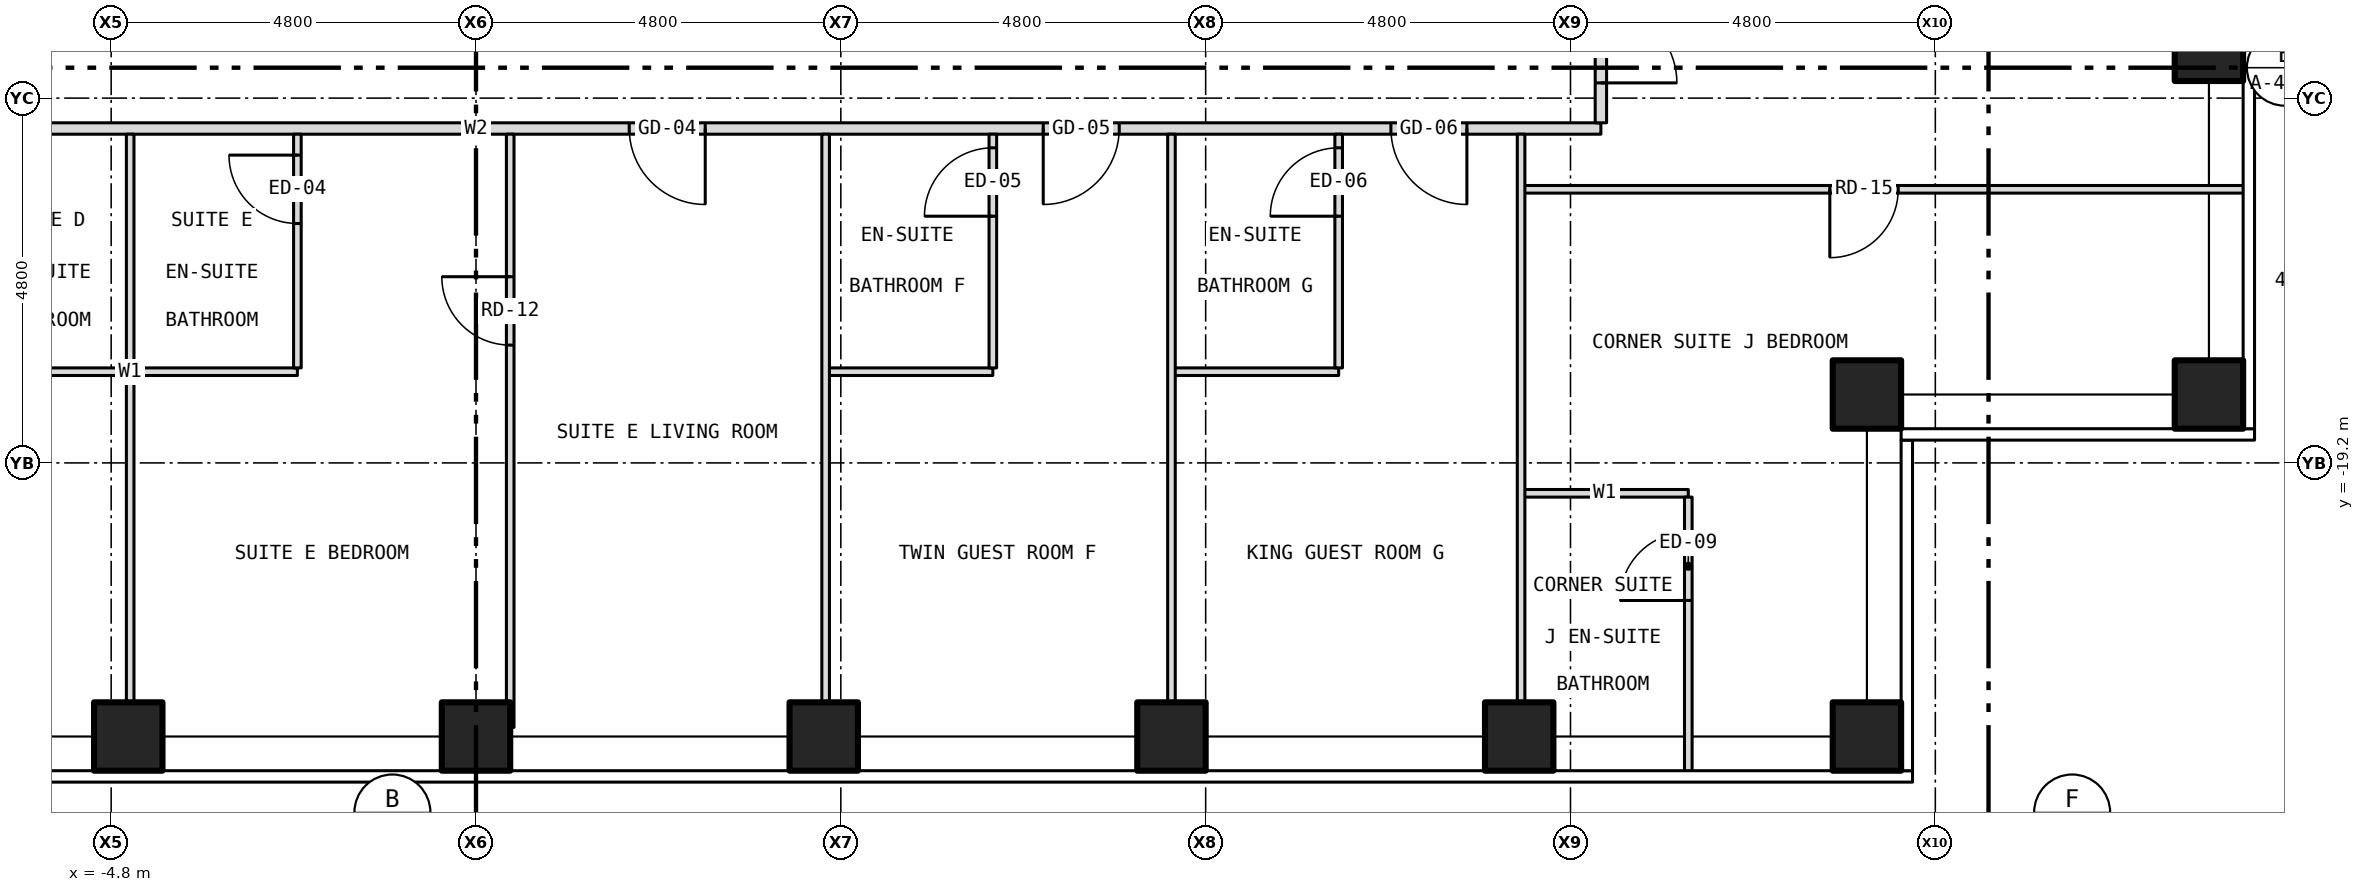
"""IFC4 building model, lengths in metres.
Left out: names, types, materials, properties, quantities, classifications, styles, units other than length and angle.
Written with IfcOpenShell. Run it as: python <this file> out.ifc"""

import sys

from ifc_helpers import new_model, si_unit, direction, frame, frame_2d, origin, origin_2d, place, context, subcontext, project, spatial, rectangle, hollow_rectangle, extrude, element, fill, save


model = new_model("IFC4")
c1 = context("Model", 3, precision=1e-05, world=origin(), true_north=direction((0.0, 1.0)))
c2 = subcontext(c1, "Body", "Model", "MODEL_VIEW")
j1 = project(units=[si_unit("LENGTHUNIT", "METRE"), si_unit("PLANEANGLEUNIT", "RADIAN")], contexts=[c1])
p1 = place(None, origin())
s1 = spatial("IfcSite", under=j1, at=p1, CompositionType="ELEMENT")
p2 = place(p1, origin())
s2 = spatial("IfcBuilding", under=s1, at=p2, CompositionType="ELEMENT")
p3 = place(p2, frame((0.0, 0.0, 103.0)))
s3 = spatial("IfcBuildingStorey", under=s2, at=p3, CompositionType="ELEMENT", Elevation=103.0)
for number, where, z_axis, x_axis in (
    (1, (-4.575, -22.8, -0.15), (0.0, 0.0, 1.0), (1.0, 0.0, 0.0)),
    (2, (0.0, -22.8, -0.15), (0.0, 0.0, 1.0), (1.0, 0.0, 0.0)),
    (3, (4.575, -22.8, -0.15), (0.0, 0.0, 1.0), (1.0, 0.0, 0.0)),
    (4, (9.15, -22.8, -0.15), (0.0, 0.0, 1.0), (1.0, 0.0, 0.0)),
    (5, (13.725, -22.8, -0.15), (0.0, 0.0, 1.0), (1.0, 0.0, 0.0)),
    (6, (18.3, -22.8, -0.15), (0.0, 0.0, 1.0), (1.0, 0.0, 0.0)),
    (7, (22.8, -18.3, -0.15), (0.0, 0.0, 1.0), (1.0, 0.0, 0.0)),
    (8, (22.8, -13.725, -0.15), (0.0, 0.0, 1.0), (1.0, 0.0, 0.0)),
    (9, (18.3, -18.3, -0.15), (0.0, 0.0, 1.0), (1.0, 0.0, 0.0)),
):
    element("IfcColumn", number, at=place(p3, frame(where, z_axis=z_axis, x_axis=x_axis)), inside=s3, PredefinedType="COLUMN", context=c2, shape_type="SweptSolid", body=[
        extrude(hollow_rectangle(XDim=0.9, YDim=0.9, WallThickness=0.05, at=origin_2d()), origin(), (0.0, 0.0, 1.0), 3.5),
    ])
p4 = place(p3, frame((13.75, -19.6, 0.0), z_axis=(0.0, 0.0, 1.0), x_axis=(1.0, 0.0, 0.0)))
e10 = element("IfcWall", 10, at=p4, inside=s3, PredefinedType="PARTITIONING", context=c2, shape_type="SweptSolid", body=[
    extrude(rectangle(XDim=2.2, YDim=0.1, at=frame_2d((1.1, 0.0))), origin(), (0.0, 0.0, 1.0), 3.35),
])
p5 = place(p3, frame((-6.75, -18.0, 0.0), z_axis=(0.0, 0.0, 1.0), x_axis=(1.0, 0.0, 0.0)))
e11 = element("IfcWall", 11, at=p5, inside=s3, PredefinedType="PARTITIONING", context=c2, shape_type="SweptSolid", body=[
    extrude(rectangle(XDim=4.4, YDim=0.1, at=frame_2d((2.2, 0.0))), origin(), (0.0, 0.0, 1.0), 3.35),
])
p6 = place(p3, frame((4.6, -18.0, 0.0), z_axis=(0.0, 0.0, 1.0), x_axis=(1.0, 0.0, 0.0)))
e12 = element("IfcWall", 12, at=p6, inside=s3, PredefinedType="PARTITIONING", context=c2, shape_type="SweptSolid", body=[
    extrude(rectangle(XDim=2.2, YDim=0.1, at=frame_2d((1.1, 0.0))), origin(), (0.0, 0.0, 1.0), 3.35),
])
p7 = place(p3, frame((9.15, -18.0, 0.0), z_axis=(0.0, 0.0, 1.0), x_axis=(1.0, 0.0, 0.0)))
e13 = element("IfcWall", 13, at=p7, inside=s3, PredefinedType="PARTITIONING", context=c2, shape_type="SweptSolid", body=[
    extrude(rectangle(XDim=2.2, YDim=0.1, at=frame_2d((1.1, 0.0))), origin(), (0.0, 0.0, 1.0), 3.35),
])
p8 = place(p3, frame((13.75, -15.6, 0.0), z_axis=(0.0, 0.0, 1.0), x_axis=(1.0, 0.0, 0.0)))
e14 = element("IfcWall", 14, at=p8, inside=s3, PredefinedType="PARTITIONING", context=c2, shape_type="SweptSolid", body=[
    extrude(rectangle(XDim=9.53, YDim=0.1, at=frame_2d((4.765, 0.0))), origin(), (0.0, 0.0, 1.0), 3.35),
])
p9 = place(p8, frame((4.062, 0.0, 0.0)))
e15 = element("IfcOpeningElement", 15, at=p9, cuts=e14, PredefinedType="OPENING", context=c2, shape_type="SweptSolid", body=[
    extrude(rectangle(XDim=0.9, YDim=2.1, at=frame_2d((0.45, 1.05))), frame((0.0, 0.062, 0.0), z_axis=(0.0, -1.0, 0.0), x_axis=(1.0, 0.0, 0.0)), (0.0, 0.0, 1.0), 0.124),
])
p10 = place(p3, frame((-14.8, -14.8, 0.0), z_axis=(0.0, 0.0, 1.0), x_axis=(1.0, 0.0, 0.0)))
e16 = element("IfcWall", 16, at=p10, inside=s3, PredefinedType="PARTITIONING", context=c2, shape_type="SweptSolid", body=[
    extrude(rectangle(XDim=29.6, YDim=0.15, at=frame_2d((14.8, 0.0))), origin(), (0.0, 0.0, 1.0), 3.35),
])
p11 = place(p10, frame((2.634, 0.0, 0.0)))
e17 = element("IfcOpeningElement", 17, at=p11, cuts=e16, PredefinedType="OPENING", context=c2, shape_type="SweptSolid", body=[
    extrude(rectangle(XDim=1.0, YDim=2.1, at=frame_2d((0.5, 1.05))), frame((0.0, 0.087, 0.0), z_axis=(0.0, -1.0, 0.0), x_axis=(1.0, 0.0, 0.0)), (0.0, 0.0, 1.0), 0.174),
])
p12 = place(p10, frame((16.816, 0.0, 0.0)))
e18 = element("IfcOpeningElement", 18, at=p12, cuts=e16, PredefinedType="OPENING", context=c2, shape_type="SweptSolid", body=[
    extrude(rectangle(XDim=1.0, YDim=2.1, at=frame_2d((0.5, 1.05))), frame((0.0, 0.087, 0.0), z_axis=(0.0, -1.0, 0.0), x_axis=(1.0, 0.0, 0.0)), (0.0, 0.0, 1.0), 0.174),
])
p13 = place(p10, frame((22.263, 0.0, 0.0)))
e19 = element("IfcOpeningElement", 19, at=p13, cuts=e16, PredefinedType="OPENING", context=c2, shape_type="SweptSolid", body=[
    extrude(rectangle(XDim=1.0, YDim=2.1, at=frame_2d((0.5, 1.05))), frame((0.0, 0.087, 0.0), z_axis=(0.0, -1.0, 0.0), x_axis=(1.0, 0.0, 0.0)), (0.0, 0.0, 1.0), 0.174),
])
p14 = place(p10, frame((26.837, 0.0, 0.0)))
e20 = element("IfcOpeningElement", 20, at=p14, cuts=e16, PredefinedType="OPENING", context=c2, shape_type="SweptSolid", body=[
    extrude(rectangle(XDim=1.0, YDim=2.1, at=frame_2d((0.5, 1.05))), frame((0.0, 0.087, 0.0), z_axis=(0.0, -1.0, 0.0), x_axis=(1.0, 0.0, 0.0)), (0.0, 0.0, 1.0), 0.174),
])
p15 = place(p3, frame((-4.55, -22.68, 0.0), z_axis=(0.0, 0.0, 1.0), x_axis=(0.0, 1.0, 0.0)))
e21 = element("IfcWall", 21, at=p15, inside=s3, PredefinedType="PARTITIONING", context=c2, shape_type="SweptSolid", body=[
    extrude(rectangle(XDim=4.63, YDim=0.1, at=frame_2d((2.315, 0.0))), origin(), (0.0, 0.0, 1.0), 3.35),
])
p16 = place(p3, frame((-4.55, -17.95, 0.0), z_axis=(0.0, 0.0, 1.0), x_axis=(0.0, 1.0, 0.0)))
e22 = element("IfcWall", 22, at=p16, inside=s3, PredefinedType="PARTITIONING", context=c2, shape_type="SweptSolid", body=[
    extrude(rectangle(XDim=3.075, YDim=0.1, at=frame_2d((1.538, 0.0))), origin(), (0.0, 0.0, 1.0), 3.35),
])
p17 = place(p3, frame((-2.35, -17.95, 0.0), z_axis=(0.0, 0.0, 1.0), x_axis=(0.0, 1.0, 0.0)))
e23 = element("IfcWall", 23, at=p17, inside=s3, PredefinedType="PARTITIONING", context=c2, shape_type="SweptSolid", body=[
    extrude(rectangle(XDim=3.075, YDim=0.1, at=frame_2d((1.538, 0.0))), origin(), (0.0, 0.0, 1.0), 3.35),
])
p18 = place(p17, frame((1.9, 0.0, 0.0)))
e24 = element("IfcOpeningElement", 24, at=p18, cuts=e23, PredefinedType="OPENING", context=c2, shape_type="SweptSolid", body=[
    extrude(rectangle(XDim=0.9, YDim=2.1, at=frame_2d((0.45, 1.05))), frame((0.0, 0.062, 0.0), z_axis=(0.0, -1.0, 0.0), x_axis=(1.0, 0.0, 0.0)), (0.0, 0.0, 1.0), 0.124),
])
p19 = place(p3, frame((0.45, -22.68, 0.0), z_axis=(0.0, 0.0, 1.0), x_axis=(0.0, 1.0, 0.0)))
e25 = element("IfcWall", 25, at=p19, inside=s3, PredefinedType="PARTITIONING", context=c2, shape_type="SweptSolid", body=[
    extrude(rectangle(XDim=7.805, YDim=0.1, at=frame_2d((3.902, 0.0))), origin(), (0.0, 0.0, 1.0), 3.35),
])
p20 = place(p19, frame((5.03, 0.0, 0.0)))
e26 = element("IfcOpeningElement", 26, at=p20, cuts=e25, PredefinedType="OPENING", context=c2, shape_type="SweptSolid", body=[
    extrude(rectangle(XDim=0.9, YDim=2.1, at=frame_2d((0.45, 1.05))), frame((0.0, 0.062, 0.0), z_axis=(0.0, -1.0, 0.0), x_axis=(1.0, 0.0, 0.0)), (0.0, 0.0, 1.0), 0.124),
])
p21 = place(p3, frame((4.6, -22.68, 0.0), z_axis=(0.0, 0.0, 1.0), x_axis=(0.0, 1.0, 0.0)))
e27 = element("IfcWall", 27, at=p21, inside=s3, PredefinedType="PARTITIONING", context=c2, shape_type="SweptSolid", body=[
    extrude(rectangle(XDim=7.805, YDim=0.1, at=frame_2d((3.902, 0.0))), origin(), (0.0, 0.0, 1.0), 3.35),
])
p22 = place(p3, frame((6.8, -17.95, 0.0), z_axis=(0.0, 0.0, 1.0), x_axis=(0.0, 1.0, 0.0)))
e28 = element("IfcWall", 28, at=p22, inside=s3, PredefinedType="PARTITIONING", context=c2, shape_type="SweptSolid", body=[
    extrude(rectangle(XDim=3.075, YDim=0.1, at=frame_2d((1.538, 0.0))), origin(), (0.0, 0.0, 1.0), 3.35),
])
p23 = place(p22, frame((1.996, 0.0, 0.0)))
e29 = element("IfcOpeningElement", 29, at=p23, cuts=e28, PredefinedType="OPENING", context=c2, shape_type="SweptSolid", body=[
    extrude(rectangle(XDim=0.9, YDim=2.1, at=frame_2d((0.45, 1.05))), frame((0.0, 0.062, 0.0), z_axis=(0.0, -1.0, 0.0), x_axis=(1.0, 0.0, 0.0)), (0.0, 0.0, 1.0), 0.124),
])
p24 = place(p3, frame((9.15, -22.68, 0.0), z_axis=(0.0, 0.0, 1.0), x_axis=(0.0, 1.0, 0.0)))
e30 = element("IfcWall", 30, at=p24, inside=s3, PredefinedType="PARTITIONING", context=c2, shape_type="SweptSolid", body=[
    extrude(rectangle(XDim=7.805, YDim=0.1, at=frame_2d((3.902, 0.0))), origin(), (0.0, 0.0, 1.0), 3.35),
])
p25 = place(p3, frame((11.35, -17.95, 0.0), z_axis=(0.0, 0.0, 1.0), x_axis=(0.0, 1.0, 0.0)))
e31 = element("IfcWall", 31, at=p25, inside=s3, PredefinedType="PARTITIONING", context=c2, shape_type="SweptSolid", body=[
    extrude(rectangle(XDim=3.075, YDim=0.1, at=frame_2d((1.538, 0.0))), origin(), (0.0, 0.0, 1.0), 3.35),
])
p26 = place(p25, frame((1.996, 0.0, 0.0)))
e32 = element("IfcOpeningElement", 32, at=p26, cuts=e31, PredefinedType="OPENING", context=c2, shape_type="SweptSolid", body=[
    extrude(rectangle(XDim=0.9, YDim=2.1, at=frame_2d((0.45, 1.05))), frame((0.0, 0.062, 0.0), z_axis=(0.0, -1.0, 0.0), x_axis=(1.0, 0.0, 0.0)), (0.0, 0.0, 1.0), 0.124),
])
p27 = place(p3, frame((13.75, -22.68, 0.0), z_axis=(0.0, 0.0, 1.0), x_axis=(0.0, 1.0, 0.0)))
e33 = element("IfcWall", 33, at=p27, inside=s3, PredefinedType="PARTITIONING", context=c2, shape_type="SweptSolid", body=[
    extrude(rectangle(XDim=7.805, YDim=0.1, at=frame_2d((3.902, 0.0))), origin(), (0.0, 0.0, 1.0), 3.35),
])
p28 = place(p3, frame((14.8, -14.725, 0.0), z_axis=(0.0, 0.0, 1.0), x_axis=(0.0, 1.0, 0.0)))
e34 = element("IfcWall", 34, at=p28, inside=s3, PredefinedType="PARTITIONING", context=c2, shape_type="SweptSolid", body=[
    extrude(rectangle(XDim=3.85, YDim=0.15, at=frame_2d((1.925, 0.0))), origin(), (0.0, 0.0, 1.0), 3.35),
])
p29 = place(p28, frame((0.525, 0.0, 0.0)))
e35 = element("IfcOpeningElement", 35, at=p29, cuts=e34, PredefinedType="OPENING", context=c2, shape_type="SweptSolid", body=[
    extrude(rectangle(XDim=1.0, YDim=2.1, at=frame_2d((0.5, 1.05))), frame((0.0, 0.087, 0.0), z_axis=(0.0, -1.0, 0.0), x_axis=(1.0, 0.0, 0.0)), (0.0, 0.0, 1.0), 0.174),
])
p30 = place(p3, frame((15.95, -23.28, 0.0), z_axis=(0.0, 0.0, 1.0), x_axis=(0.0, 1.0, 0.0)))
e36 = element("IfcWall", 36, at=p30, inside=s3, PredefinedType="PARTITIONING", context=c2, shape_type="SweptSolid", body=[
    extrude(rectangle(XDim=3.63, YDim=0.1, at=frame_2d((1.815, 0.0))), origin(), (0.0, 0.0, 1.0), 3.35),
])
p31 = place(p30, frame((2.27, 0.0, 0.0)))
e37 = element("IfcOpeningElement", 37, at=p31, cuts=e36, PredefinedType="OPENING", context=c2, shape_type="SweptSolid", body=[
    extrude(rectangle(XDim=0.9, YDim=2.1, at=frame_2d((0.45, 1.05))), frame((0.0, 0.062, 0.0), z_axis=(0.0, -1.0, 0.0), x_axis=(1.0, 0.0, 0.0)), (0.0, 0.0, 1.0), 0.124),
])
p32 = place(p12, origin())
e38 = element("IfcDoor", 38, at=p32, inside=s3, OperationType="SINGLE_SWING_RIGHT", PredefinedType="DOOR", context=c2, shape_type="SweptSolid", body=[
    extrude(rectangle(XDim=1.0, YDim=2.1, at=frame_2d((0.5, 1.05))), frame((0.0, 0.025, 0.0), z_axis=(0.0, -1.0, 0.0), x_axis=(1.0, 0.0, 0.0)), (0.0, 0.0, 1.0), 0.05),
])
fill(e18, e38)
p33 = place(p20, origin())
e39 = element("IfcDoor", 39, at=p33, inside=s3, OperationType="SINGLE_SWING_RIGHT", PredefinedType="DOOR", context=c2, shape_type="SweptSolid", body=[
    extrude(rectangle(XDim=0.9, YDim=2.1, at=frame_2d((0.45, 1.05))), frame((0.0, 0.025, 0.0), z_axis=(0.0, -1.0, 0.0), x_axis=(1.0, 0.0, 0.0)), (0.0, 0.0, 1.0), 0.05),
])
fill(e26, e39)
p34 = place(p18, origin())
e40 = element("IfcDoor", 40, at=p34, inside=s3, OperationType="SINGLE_SWING_RIGHT", PredefinedType="DOOR", context=c2, shape_type="SweptSolid", body=[
    extrude(rectangle(XDim=0.9, YDim=2.1, at=frame_2d((0.45, 1.05))), frame((0.0, 0.025, 0.0), z_axis=(0.0, -1.0, 0.0), x_axis=(1.0, 0.0, 0.0)), (0.0, 0.0, 1.0), 0.05),
])
fill(e24, e40)
p35 = place(p13, origin())
e41 = element("IfcDoor", 41, at=p35, inside=s3, OperationType="SINGLE_SWING_LEFT", PredefinedType="DOOR", context=c2, shape_type="SweptSolid", body=[
    extrude(rectangle(XDim=1.0, YDim=2.1, at=frame_2d((0.5, 1.05))), frame((0.0, 0.025, 0.0), z_axis=(0.0, -1.0, 0.0), x_axis=(1.0, 0.0, 0.0)), (0.0, 0.0, 1.0), 0.05),
])
fill(e19, e41)
p36 = place(p23, origin())
e42 = element("IfcDoor", 42, at=p36, inside=s3, OperationType="SINGLE_SWING_LEFT", PredefinedType="DOOR", context=c2, shape_type="SweptSolid", body=[
    extrude(rectangle(XDim=0.9, YDim=2.1, at=frame_2d((0.45, 1.05))), frame((0.0, 0.025, 0.0), z_axis=(0.0, -1.0, 0.0), x_axis=(1.0, 0.0, 0.0)), (0.0, 0.0, 1.0), 0.05),
])
fill(e29, e42)
p37 = place(p14, origin())
e43 = element("IfcDoor", 43, at=p37, inside=s3, OperationType="SINGLE_SWING_RIGHT", PredefinedType="DOOR", context=c2, shape_type="SweptSolid", body=[
    extrude(rectangle(XDim=1.0, YDim=2.1, at=frame_2d((0.5, 1.05))), frame((0.0, 0.025, 0.0), z_axis=(0.0, -1.0, 0.0), x_axis=(1.0, 0.0, 0.0)), (0.0, 0.0, 1.0), 0.05),
])
fill(e20, e43)
p38 = place(p26, origin())
e44 = element("IfcDoor", 44, at=p38, inside=s3, OperationType="SINGLE_SWING_LEFT", PredefinedType="DOOR", context=c2, shape_type="SweptSolid", body=[
    extrude(rectangle(XDim=0.9, YDim=2.1, at=frame_2d((0.45, 1.05))), frame((0.0, 0.025, 0.0), z_axis=(0.0, -1.0, 0.0), x_axis=(1.0, 0.0, 0.0)), (0.0, 0.0, 1.0), 0.05),
])
fill(e32, e44)
p39 = place(p29, origin())
e45 = element("IfcDoor", 45, at=p39, inside=s3, OperationType="SINGLE_SWING_LEFT", PredefinedType="DOOR", context=c2, shape_type="SweptSolid", body=[
    extrude(rectangle(XDim=1.0, YDim=2.1, at=frame_2d((0.5, 1.05))), frame((0.0, 0.025, 0.0), z_axis=(0.0, -1.0, 0.0), x_axis=(1.0, 0.0, 0.0)), (0.0, 0.0, 1.0), 0.05),
])
fill(e35, e45)
p40 = place(p9, origin())
e46 = element("IfcDoor", 46, at=p40, inside=s3, OperationType="SINGLE_SWING_LEFT", PredefinedType="DOOR", context=c2, shape_type="SweptSolid", body=[
    extrude(rectangle(XDim=0.9, YDim=2.1, at=frame_2d((0.45, 1.05))), frame((0.0, 0.025, 0.0), z_axis=(0.0, -1.0, 0.0), x_axis=(1.0, 0.0, 0.0)), (0.0, 0.0, 1.0), 0.05),
])
fill(e15, e46)
p41 = place(p31, origin())
e47 = element("IfcDoor", 47, at=p41, inside=s3, OperationType="SINGLE_SWING_LEFT", PredefinedType="DOOR", context=c2, shape_type="SweptSolid", body=[
    extrude(rectangle(XDim=0.9, YDim=2.1, at=frame_2d((0.45, 1.05))), frame((0.0, 0.025, 0.0), z_axis=(0.0, -1.0, 0.0), x_axis=(1.0, 0.0, 0.0)), (0.0, 0.0, 1.0), 0.05),
])
fill(e37, e47)
save(model, sys.argv[1])
